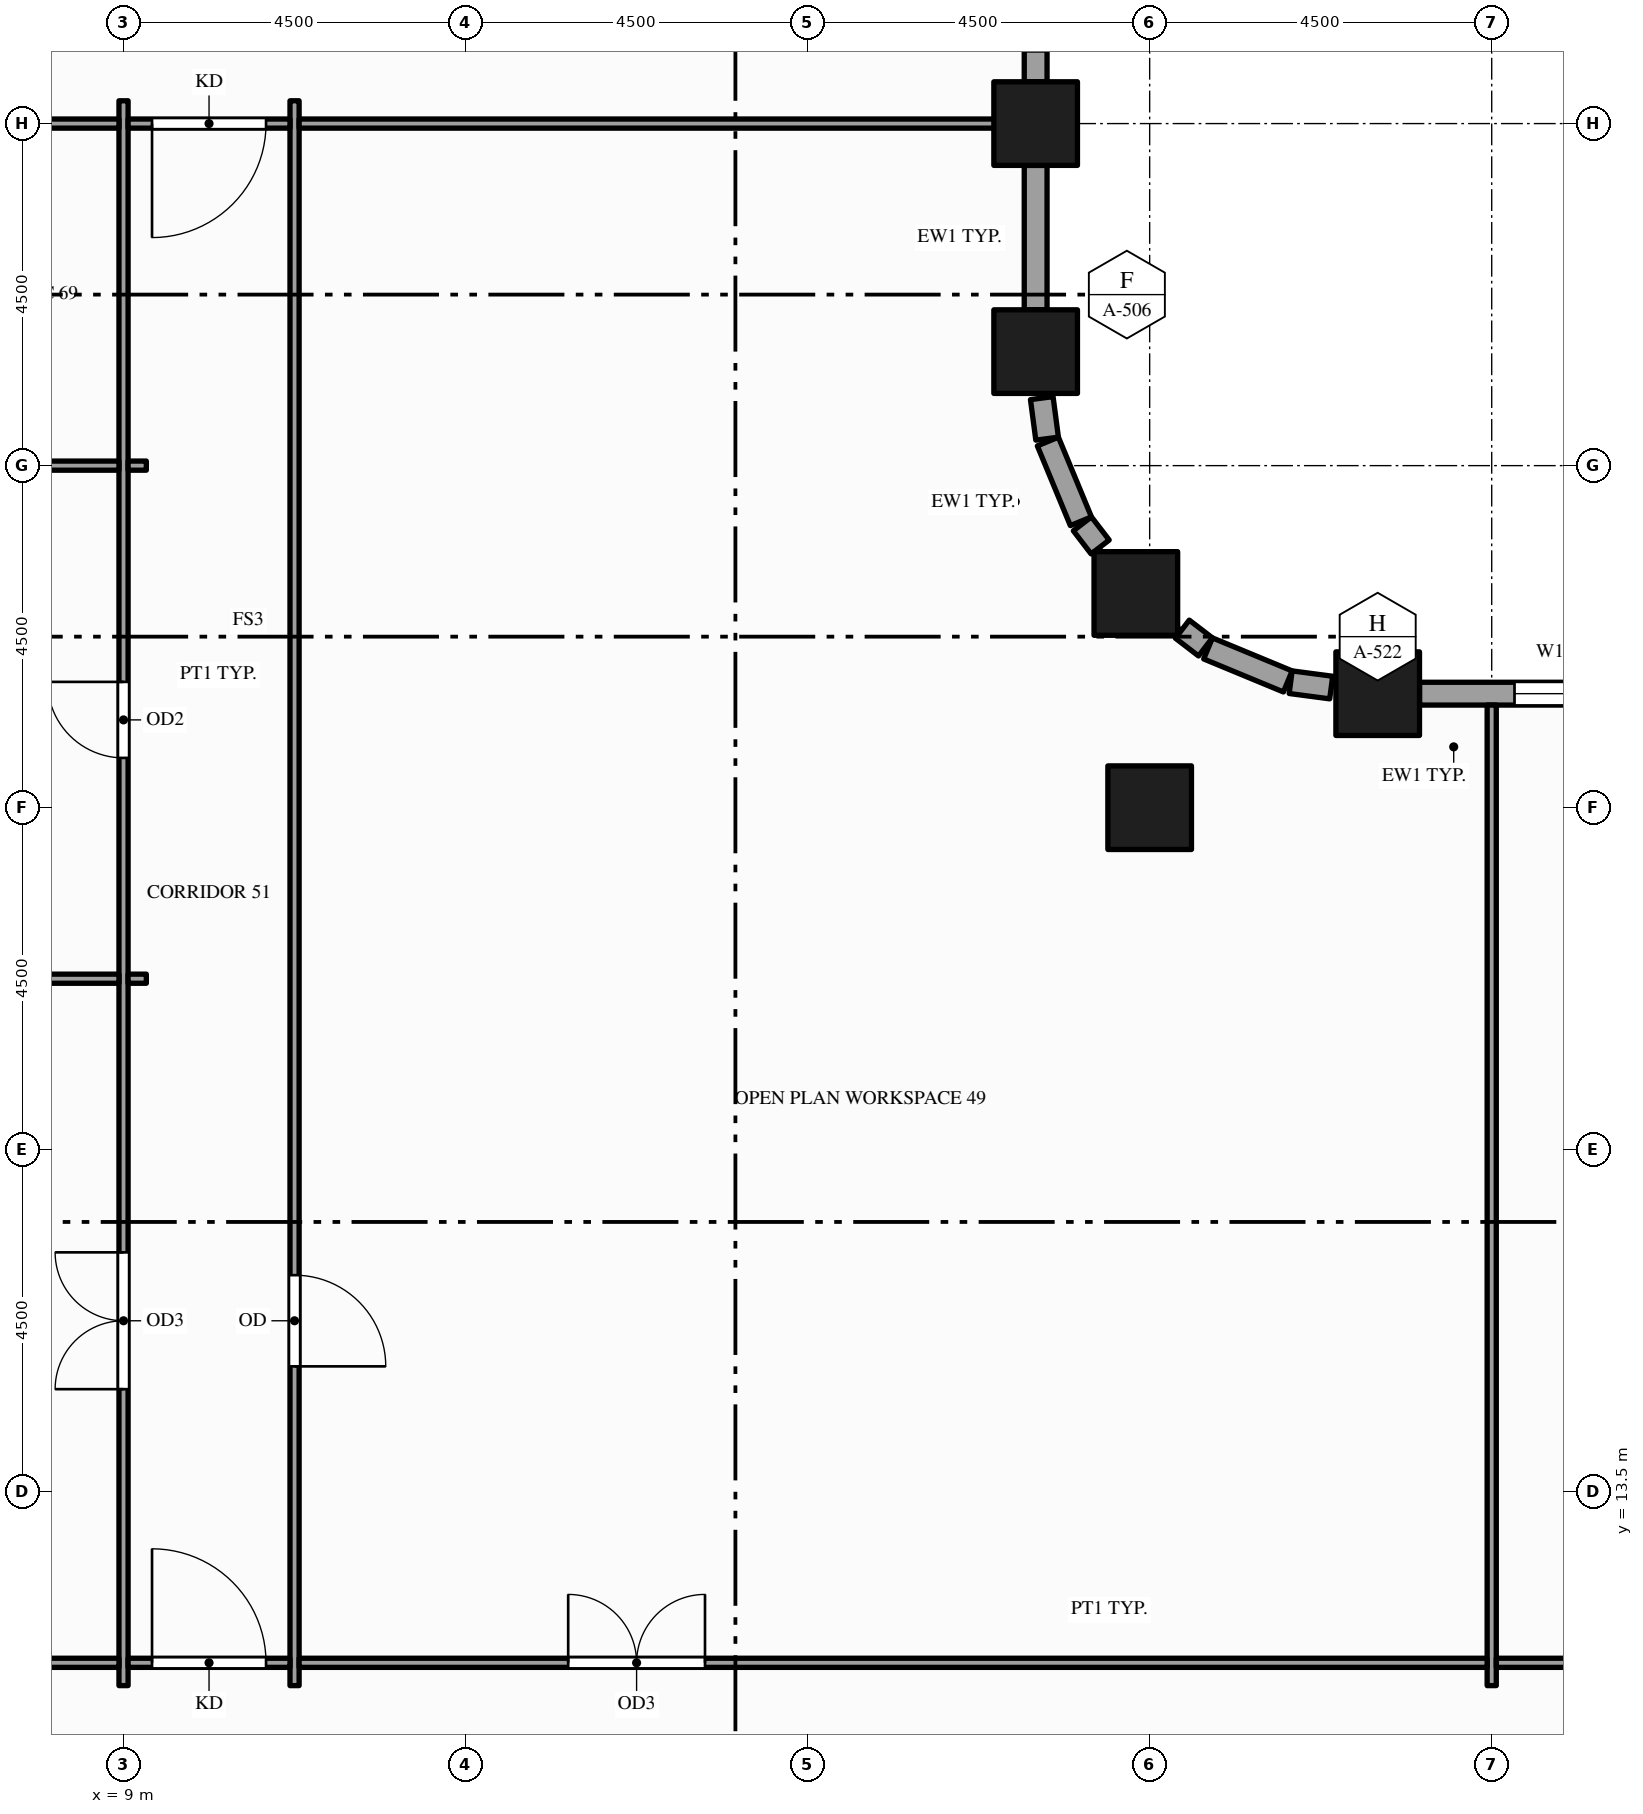
"""IFC4 building model, lengths in metres.
Left out: names, types, materials, properties, quantities, classifications, styles, units other than length and angle.
Written with IfcOpenShell. Run it as: python <this file> out.ifc"""

import sys

from ifc_helpers import new_model, si_unit, direction, frame, frame_2d, origin, origin_2d, place, context, subcontext, project, spatial, rectangle, hollow_rectangle, extrude, element, fill, save


model = new_model("IFC4")
c1 = context("Model", 3, precision=1e-05, world=origin(), true_north=direction((0.0, 1.0)))
c2 = subcontext(c1, "Body", "Model", "MODEL_VIEW")
j1 = project(units=[si_unit("LENGTHUNIT", "METRE"), si_unit("PLANEANGLEUNIT", "RADIAN")], contexts=[c1])
p1 = place(None, origin())
s1 = spatial("IfcSite", under=j1, at=p1, CompositionType="ELEMENT")
p2 = place(p1, origin())
s2 = spatial("IfcBuilding", under=s1, at=p2, CompositionType="ELEMENT")
p3 = place(p2, frame((0.0, 0.0, 69.0)))
s3 = spatial("IfcBuildingStorey", under=s2, at=p3, CompositionType="ELEMENT", Elevation=69.0)
for number, where, z_axis, x_axis in (
    (1, (21.0, 28.5, -0.15), (0.0, 0.0, 1.0), (1.0, 0.0, 0.0)),
    (2, (21.0, 31.5, -0.15), (0.0, 0.0, 1.0), (1.0, 0.0, 0.0)),
    (3, (22.318, 25.318, -0.15), (0.0, 0.0, 1.0), (1.0, 0.0, 0.0)),
    (4, (22.5, 22.5, -0.15), (0.0, 0.0, 1.0), (1.0, 0.0, 0.0)),
    (5, (25.5, 24.0, -0.15), (0.0, 0.0, 1.0), (1.0, 0.0, 0.0)),
):
    element("IfcColumn", number, at=place(p3, frame(where, z_axis=z_axis, x_axis=x_axis)), inside=s3, PredefinedType="COLUMN", context=c2, shape_type="SweptSolid", body=[
        extrude(hollow_rectangle(XDim=1.1, YDim=1.1, WallThickness=0.06, at=origin_2d()), origin(), (0.0, 0.0, 1.0), 4.0),
    ])
p4 = place(p3, frame((30.95, 24.0, 0.0), z_axis=(0.0, 0.0, 1.0), x_axis=(-1.0, 0.0, 0.0)))
e6 = element("IfcWall", 6, at=p4, inside=s3, PredefinedType="STANDARD", context=c2, shape_type="SweptSolid", body=[
    extrude(rectangle(XDim=4.9, YDim=0.3, at=frame_2d((2.45, 0.0))), origin(), (0.0, 0.0, 1.0), 3.144),
])
p5 = place(p4, frame((0.4, 0.0, 0.9)))
e7 = element("IfcOpeningElement", 7, at=p5, cuts=e6, PredefinedType="OPENING", context=c2, shape_type="SweptSolid", body=[
    extrude(rectangle(XDim=1.0, YDim=2.0, at=frame_2d((0.5, 1.0))), frame((0.0, 0.16, 0.0), z_axis=(0.0, -1.0, 0.0), x_axis=(1.0, 0.0, 0.0)), (0.0, 0.0, 1.0), 0.32),
])
p6 = place(p4, frame((2.0, 0.0, 0.9)))
e8 = element("IfcOpeningElement", 8, at=p6, cuts=e6, PredefinedType="OPENING", context=c2, shape_type="SweptSolid", body=[
    extrude(rectangle(XDim=1.65, YDim=2.0, at=frame_2d((0.825, 1.0))), frame((0.0, 0.16, 0.0), z_axis=(0.0, -1.0, 0.0), x_axis=(1.0, 0.0, 0.0)), (0.0, 0.0, 1.0), 0.32),
])
p7 = place(p3, frame((24.888, 24.081, 0.0), z_axis=(0.0, 0.0, 1.0), x_axis=(-0.991417173479, 0.130736330569, 0.0)))
e9 = element("IfcWall", 9, at=p7, inside=s3, PredefinedType="STANDARD", context=c2, shape_type="SweptSolid", body=[
    extrude(rectangle(XDim=0.538, YDim=0.3, at=frame_2d((0.269, 0.0))), origin(), (0.0, 0.0, 1.0), 2.938),
])
p8 = place(p3, frame((24.317, 24.161, 0.0), z_axis=(0.0, 0.0, 1.0), x_axis=(-0.923914616768, 0.382598720491, 0.0)))
e10 = element("IfcWall", 10, at=p8, inside=s3, PredefinedType="STANDARD", context=c2, shape_type="SweptSolid", body=[
    extrude(rectangle(XDim=1.135, YDim=0.3, at=frame_2d((0.568, 0.0))), origin(), (0.0, 0.0, 1.0), 3.144),
])
for number, where, z_axis, x_axis in (
    (11, (23.234, 24.615, 0.0), (0.0, 0.0, 1.0), (-0.794, 0.609, 0.0)),
    (12, (21.849, 25.93, 0.0), (0.0, 0.0, 1.0), (-0.609, 0.794, 0.0)),
):
    element("IfcWall", number, at=place(p3, frame(where, z_axis=z_axis, x_axis=x_axis)), inside=s3, PredefinedType="STANDARD", context=c2, shape_type="SweptSolid", body=[
        extrude(rectangle(XDim=0.384, YDim=0.3, at=frame_2d((0.192, 0.0))), origin(), (0.0, 0.0, 1.0), 3.144),
    ])
p9 = place(p3, frame((21.595, 26.268, 0.0), z_axis=(0.0, 0.0, 1.0), x_axis=(-0.382598720491, 0.923914616768, 0.0)))
e13 = element("IfcWall", 13, at=p9, inside=s3, PredefinedType="STANDARD", context=c2, shape_type="SweptSolid", body=[
    extrude(rectangle(XDim=1.135, YDim=0.3, at=frame_2d((0.568, 0.0))), origin(), (0.0, 0.0, 1.0), 3.144),
])
p10 = place(p3, frame((21.151, 27.355, 0.0), z_axis=(0.0, 0.0, 1.0), x_axis=(-0.130736330569, 0.991417173479, 0.0)))
e14 = element("IfcWall", 14, at=p10, inside=s3, PredefinedType="STANDARD", context=c2, shape_type="SweptSolid", body=[
    extrude(rectangle(XDim=0.538, YDim=0.3, at=frame_2d((0.269, 0.0))), origin(), (0.0, 0.0, 1.0), 3.144),
])
p11 = place(p3, frame((21.0, 29.05, 0.0), z_axis=(0.0, 0.0, 1.0), x_axis=(0.0, 1.0, 0.0)))
e15 = element("IfcWall", 15, at=p11, inside=s3, PredefinedType="STANDARD", context=c2, shape_type="SweptSolid", body=[
    extrude(rectangle(XDim=1.9, YDim=0.3, at=frame_2d((0.95, 0.0))), origin(), (0.0, 0.0, 1.0), 3.144),
])
p12 = place(p3, frame((21.0, 32.05, 0.0), z_axis=(0.0, 0.0, 1.0), x_axis=(0.0, 1.0, 0.0)))
e16 = element("IfcWall", 16, at=p12, inside=s3, PredefinedType="STANDARD", context=c2, shape_type="SweptSolid", body=[
    extrude(rectangle(XDim=3.95, YDim=0.3, at=frame_2d((1.975, 0.0))), origin(), (0.0, 0.0, 1.0), 3.144),
])
p13 = place(p12, frame((0.4, 0.0, 0.9)))
e17 = element("IfcOpeningElement", 17, at=p13, cuts=e16, PredefinedType="OPENING", context=c2, shape_type="SweptSolid", body=[
    extrude(rectangle(XDim=1.0, YDim=2.0, at=frame_2d((0.5, 1.0))), frame((0.0, 0.16, 0.0), z_axis=(0.0, -1.0, 0.0), x_axis=(1.0, 0.0, 0.0)), (0.0, 0.0, 1.0), 0.32),
])
p14 = place(p12, frame((2.0, 0.0, 0.9)))
e18 = element("IfcOpeningElement", 18, at=p14, cuts=e16, PredefinedType="OPENING", context=c2, shape_type="SweptSolid", body=[
    extrude(rectangle(XDim=1.55, YDim=2.0, at=frame_2d((0.775, 1.0))), frame((0.0, 0.16, 0.0), z_axis=(0.0, -1.0, 0.0), x_axis=(1.0, 0.0, 0.0)), (0.0, 0.0, 1.0), 0.32),
])
p15 = place(p3, frame((9.0, 10.95, 0.0), z_axis=(0.0, 0.0, 1.0), x_axis=(0.0, 1.0, 0.0)))
e19 = element("IfcWall", 19, at=p15, inside=s3, PredefinedType="PARTITIONING", context=c2, shape_type="SweptSolid", body=[
    extrude(rectangle(XDim=20.85, YDim=0.12, at=frame_2d((10.425, 0.0))), origin(), (0.0, 0.0, 1.0), 2.6),
])
p16 = place(p15, frame((3.9, 0.0, 0.0)))
e20 = element("IfcOpeningElement", 20, at=p16, cuts=e19, PredefinedType="OPENING", context=c2, shape_type="SweptSolid", body=[
    extrude(rectangle(XDim=1.8, YDim=2.1, at=frame_2d((0.9, 1.05))), frame((0.0, 0.07, 0.0), z_axis=(0.0, -1.0, 0.0), x_axis=(1.0, 0.0, 0.0)), (0.0, 0.0, 1.0), 0.14),
])
p17 = place(p15, frame((12.205, 0.0, 0.0)))
e21 = element("IfcOpeningElement", 21, at=p17, cuts=e19, PredefinedType="OPENING", context=c2, shape_type="SweptSolid", body=[
    extrude(rectangle(XDim=1.0, YDim=2.1, at=frame_2d((0.5, 1.05))), frame((0.0, 0.07, 0.0), z_axis=(0.0, -1.0, 0.0), x_axis=(1.0, 0.0, 0.0)), (0.0, 0.0, 1.0), 0.14),
])
p18 = place(p3, frame((11.25, 10.95, 0.0), z_axis=(0.0, 0.0, 1.0), x_axis=(0.0, 1.0, 0.0)))
e22 = element("IfcWall", 22, at=p18, inside=s3, PredefinedType="PARTITIONING", context=c2, shape_type="SweptSolid", body=[
    extrude(rectangle(XDim=20.85, YDim=0.12, at=frame_2d((10.425, 0.0))), origin(), (0.0, 0.0, 1.0), 2.6),
])
p19 = place(p18, frame((4.2, 0.0, 0.0)))
e23 = element("IfcOpeningElement", 23, at=p19, cuts=e22, PredefinedType="OPENING", context=c2, shape_type="SweptSolid", body=[
    extrude(rectangle(XDim=1.2, YDim=2.1, at=frame_2d((0.6, 1.05))), frame((0.0, 0.07, 0.0), z_axis=(0.0, -1.0, 0.0), x_axis=(1.0, 0.0, 0.0)), (0.0, 0.0, 1.0), 0.14),
])
p20 = place(p3, frame((27.0, 10.95, 0.0), z_axis=(0.0, 0.0, 1.0), x_axis=(0.0, 1.0, 0.0)))
e24 = element("IfcWall", 24, at=p20, inside=s3, PredefinedType="PARTITIONING", context=c2, shape_type="SweptSolid", body=[
    extrude(rectangle(XDim=12.9, YDim=0.12, at=frame_2d((6.45, 0.0))), origin(), (0.0, 0.0, 1.0), 2.938),
])
p21 = place(p3, frame((0.15, 11.25, 0.0), z_axis=(0.0, 0.0, 1.0), x_axis=(1.0, 0.0, 0.0)))
e25 = element("IfcWall", 25, at=p21, inside=s3, PredefinedType="PARTITIONING", context=c2, shape_type="SweptSolid", body=[
    extrude(rectangle(XDim=8.79, YDim=0.12, at=frame_2d((4.395, 0.0))), origin(), (0.0, 0.0, 1.0), 2.938),
])
p22 = place(p3, frame((9.06, 11.25, 0.0), z_axis=(0.0, 0.0, 1.0), x_axis=(1.0, 0.0, 0.0)))
e26 = element("IfcWall", 26, at=p22, inside=s3, PredefinedType="PARTITIONING", context=c2, shape_type="SweptSolid", body=[
    extrude(rectangle(XDim=2.13, YDim=0.12, at=frame_2d((1.065, 0.0))), origin(), (0.0, 0.0, 1.0), 2.938),
])
p23 = place(p22, frame((0.315, 0.0, 0.0)))
e27 = element("IfcOpeningElement", 27, at=p23, cuts=e26, PredefinedType="OPENING", context=c2, shape_type="SweptSolid", body=[
    extrude(rectangle(XDim=1.5, YDim=2.1, at=frame_2d((0.75, 1.05))), frame((0.0, 0.07, 0.0), z_axis=(0.0, -1.0, 0.0), x_axis=(1.0, 0.0, 0.0)), (0.0, 0.0, 1.0), 0.14),
])
p24 = place(p3, frame((11.31, 11.25, 0.0), z_axis=(0.0, 0.0, 1.0), x_axis=(1.0, 0.0, 0.0)))
e28 = element("IfcWall", 28, at=p24, inside=s3, PredefinedType="PARTITIONING", context=c2, shape_type="SweptSolid", body=[
    extrude(rectangle(XDim=15.63, YDim=0.12, at=frame_2d((7.815, 0.0))), origin(), (0.0, 0.0, 1.0), 2.938),
])
p25 = place(p24, frame((3.54, 0.0, 0.0)))
e29 = element("IfcOpeningElement", 29, at=p25, cuts=e28, PredefinedType="OPENING", context=c2, shape_type="SweptSolid", body=[
    extrude(rectangle(XDim=1.8, YDim=2.1, at=frame_2d((0.9, 1.05))), frame((0.0, 0.07, 0.0), z_axis=(0.0, -1.0, 0.0), x_axis=(1.0, 0.0, 0.0)), (0.0, 0.0, 1.0), 0.14),
])
p26 = place(p3, frame((27.06, 11.25, 0.0), z_axis=(0.0, 0.0, 1.0), x_axis=(1.0, 0.0, 0.0)))
e30 = element("IfcWall", 30, at=p26, inside=s3, PredefinedType="PARTITIONING", context=c2, shape_type="SweptSolid", body=[
    extrude(rectangle(XDim=4.38, YDim=0.12, at=frame_2d((2.19, 0.0))), origin(), (0.0, 0.0, 1.0), 2.938),
])
p27 = place(p26, frame((1.59, 0.0, 0.0)))
e31 = element("IfcOpeningElement", 31, at=p27, cuts=e30, PredefinedType="OPENING", context=c2, shape_type="SweptSolid", body=[
    extrude(rectangle(XDim=1.2, YDim=2.1, at=frame_2d((0.6, 1.05))), frame((0.0, 0.07, 0.0), z_axis=(0.0, -1.0, 0.0), x_axis=(1.0, 0.0, 0.0)), (0.0, 0.0, 1.0), 0.14),
])
p28 = place(p3, frame((0.15, 20.25, 0.0), z_axis=(0.0, 0.0, 1.0), x_axis=(1.0, 0.0, 0.0)))
e32 = element("IfcWall", 32, at=p28, inside=s3, PredefinedType="PARTITIONING", context=c2, shape_type="SweptSolid", body=[
    extrude(rectangle(XDim=8.79, YDim=0.12, at=frame_2d((4.395, 0.0))), origin(), (0.0, 0.0, 1.0), 2.938),
])
p29 = place(p3, frame((9.06, 20.25, 0.0), z_axis=(0.0, 0.0, 1.0), x_axis=(1.0, 0.0, 0.0)))
e33 = element("IfcWall", 33, at=p29, inside=s3, PredefinedType="PARTITIONING", context=c2, shape_type="SweptSolid", body=[
    extrude(rectangle(XDim=0.24, YDim=0.12, at=frame_2d((0.12, 0.0))), origin(), (0.0, 0.0, 1.0), 2.938),
])
p30 = place(p3, frame((5.56, 27.0, 0.0), z_axis=(0.0, 0.0, 1.0), x_axis=(1.0, 0.0, 0.0)))
e34 = element("IfcWall", 34, at=p30, inside=s3, PredefinedType="PARTITIONING", context=c2, shape_type="SweptSolid", body=[
    extrude(rectangle(XDim=3.38, YDim=0.12, at=frame_2d((1.69, 0.0))), origin(), (0.0, 0.0, 1.0), 2.938),
])
p31 = place(p3, frame((9.06, 27.0, 0.0), z_axis=(0.0, 0.0, 1.0), x_axis=(1.0, 0.0, 0.0)))
e35 = element("IfcWall", 35, at=p31, inside=s3, PredefinedType="PARTITIONING", context=c2, shape_type="SweptSolid", body=[
    extrude(rectangle(XDim=0.24, YDim=0.12, at=frame_2d((0.12, 0.0))), origin(), (0.0, 0.0, 1.0), 2.938),
])
p32 = place(p3, frame((5.56, 31.5, 0.0), z_axis=(0.0, 0.0, 1.0), x_axis=(1.0, 0.0, 0.0)))
e36 = element("IfcWall", 36, at=p32, inside=s3, PredefinedType="PARTITIONING", context=c2, shape_type="SweptSolid", body=[
    extrude(rectangle(XDim=3.38, YDim=0.12, at=frame_2d((1.69, 0.0))), origin(), (0.0, 0.0, 1.0), 2.938),
])
p33 = place(p32, frame((1.19, 0.0, 0.0)))
e37 = element("IfcOpeningElement", 37, at=p33, cuts=e36, PredefinedType="OPENING", context=c2, shape_type="SweptSolid", body=[
    extrude(rectangle(XDim=1.0, YDim=2.1, at=frame_2d((0.5, 1.05))), frame((0.0, 0.07, 0.0), z_axis=(0.0, -1.0, 0.0), x_axis=(1.0, 0.0, 0.0)), (0.0, 0.0, 1.0), 0.14),
])
p34 = place(p3, frame((9.06, 31.5, 0.0), z_axis=(0.0, 0.0, 1.0), x_axis=(1.0, 0.0, 0.0)))
e38 = element("IfcWall", 38, at=p34, inside=s3, PredefinedType="PARTITIONING", context=c2, shape_type="SweptSolid", body=[
    extrude(rectangle(XDim=2.13, YDim=0.12, at=frame_2d((1.065, 0.0))), origin(), (0.0, 0.0, 1.0), 2.938),
])
p35 = place(p34, frame((0.315, 0.0, 0.0)))
e39 = element("IfcOpeningElement", 39, at=p35, cuts=e38, PredefinedType="OPENING", context=c2, shape_type="SweptSolid", body=[
    extrude(rectangle(XDim=1.5, YDim=2.1, at=frame_2d((0.75, 1.05))), frame((0.0, 0.07, 0.0), z_axis=(0.0, -1.0, 0.0), x_axis=(1.0, 0.0, 0.0)), (0.0, 0.0, 1.0), 0.14),
])
p36 = place(p3, frame((11.31, 31.5, 0.0), z_axis=(0.0, 0.0, 1.0), x_axis=(1.0, 0.0, 0.0)))
e40 = element("IfcWall", 40, at=p36, inside=s3, PredefinedType="PARTITIONING", context=c2, shape_type="SweptSolid", body=[
    extrude(rectangle(XDim=9.54, YDim=0.12, at=frame_2d((4.77, 0.0))), origin(), (0.0, 0.0, 1.0), 2.938),
])
p37 = place(p6, origin())
e41 = element("IfcWindow", 41, at=p37, inside=s3, PartitioningType="SINGLE_PANEL", PredefinedType="WINDOW", context=c2, shape_type="SweptSolid", body=[
    extrude(rectangle(XDim=1.65, YDim=2.0, at=frame_2d((0.825, 1.0))), frame((0.0, 0.03, 0.0), z_axis=(0.0, -1.0, 0.0), x_axis=(1.0, 0.0, 0.0)), (0.0, 0.0, 1.0), 0.06),
])
fill(e8, e41)
p38 = place(p25, origin())
e42 = element("IfcDoor", 42, at=p38, inside=s3, OperationType="DOUBLE_DOOR_SINGLE_SWING", PredefinedType="DOOR", context=c2, shape_type="SweptSolid", body=[
    extrude(rectangle(XDim=1.8, YDim=2.1, at=frame_2d((0.9, 1.05))), frame((0.0, 0.025, 0.0), z_axis=(0.0, -1.0, 0.0), x_axis=(1.0, 0.0, 0.0)), (0.0, 0.0, 1.0), 0.05),
])
fill(e29, e42)
p39 = place(p23, origin())
e43 = element("IfcDoor", 43, at=p39, inside=s3, OperationType="SINGLE_SWING_LEFT", PredefinedType="DOOR", context=c2, shape_type="SweptSolid", body=[
    extrude(rectangle(XDim=1.5, YDim=2.1, at=frame_2d((0.75, 1.05))), frame((0.0, 0.025, 0.0), z_axis=(0.0, -1.0, 0.0), x_axis=(1.0, 0.0, 0.0)), (0.0, 0.0, 1.0), 0.05),
])
fill(e27, e43)
p40 = place(p35, origin())
e44 = element("IfcDoor", 44, at=p40, inside=s3, OperationType="SINGLE_SWING_LEFT", PredefinedType="DOOR", context=c2, shape_type="SweptSolid", body=[
    extrude(rectangle(XDim=1.5, YDim=2.1, at=frame_2d((0.75, 1.05))), frame((0.0, 0.025, 0.0), z_axis=(0.0, -1.0, 0.0), x_axis=(1.0, 0.0, 0.0)), (0.0, 0.0, 1.0), 0.05),
])
fill(e39, e44)
p41 = place(p16, origin())
e45 = element("IfcDoor", 45, at=p41, inside=s3, OperationType="DOUBLE_DOOR_SINGLE_SWING", PredefinedType="DOOR", context=c2, shape_type="SweptSolid", body=[
    extrude(rectangle(XDim=1.8, YDim=2.1, at=frame_2d((0.9, 1.05))), frame((0.0, 0.025, 0.0), z_axis=(0.0, -1.0, 0.0), x_axis=(1.0, 0.0, 0.0)), (0.0, 0.0, 1.0), 0.05),
])
fill(e20, e45)
p42 = place(p17, origin())
e46 = element("IfcDoor", 46, at=p42, inside=s3, OperationType="SINGLE_SWING_RIGHT", PredefinedType="DOOR", context=c2, shape_type="SweptSolid", body=[
    extrude(rectangle(XDim=1.0, YDim=2.1, at=frame_2d((0.5, 1.05))), frame((0.0, 0.025, 0.0), z_axis=(0.0, -1.0, 0.0), x_axis=(1.0, 0.0, 0.0)), (0.0, 0.0, 1.0), 0.05),
])
fill(e21, e46)
p43 = place(p19, origin())
e47 = element("IfcDoor", 47, at=p43, inside=s3, OperationType="SINGLE_SWING_LEFT", PredefinedType="DOOR", context=c2, shape_type="SweptSolid", body=[
    extrude(rectangle(XDim=1.2, YDim=2.1, at=frame_2d((0.6, 1.05))), frame((0.0, 0.025, 0.0), z_axis=(0.0, -1.0, 0.0), x_axis=(1.0, 0.0, 0.0)), (0.0, 0.0, 1.0), 0.05),
])
fill(e23, e47)
save(model, sys.argv[1])
